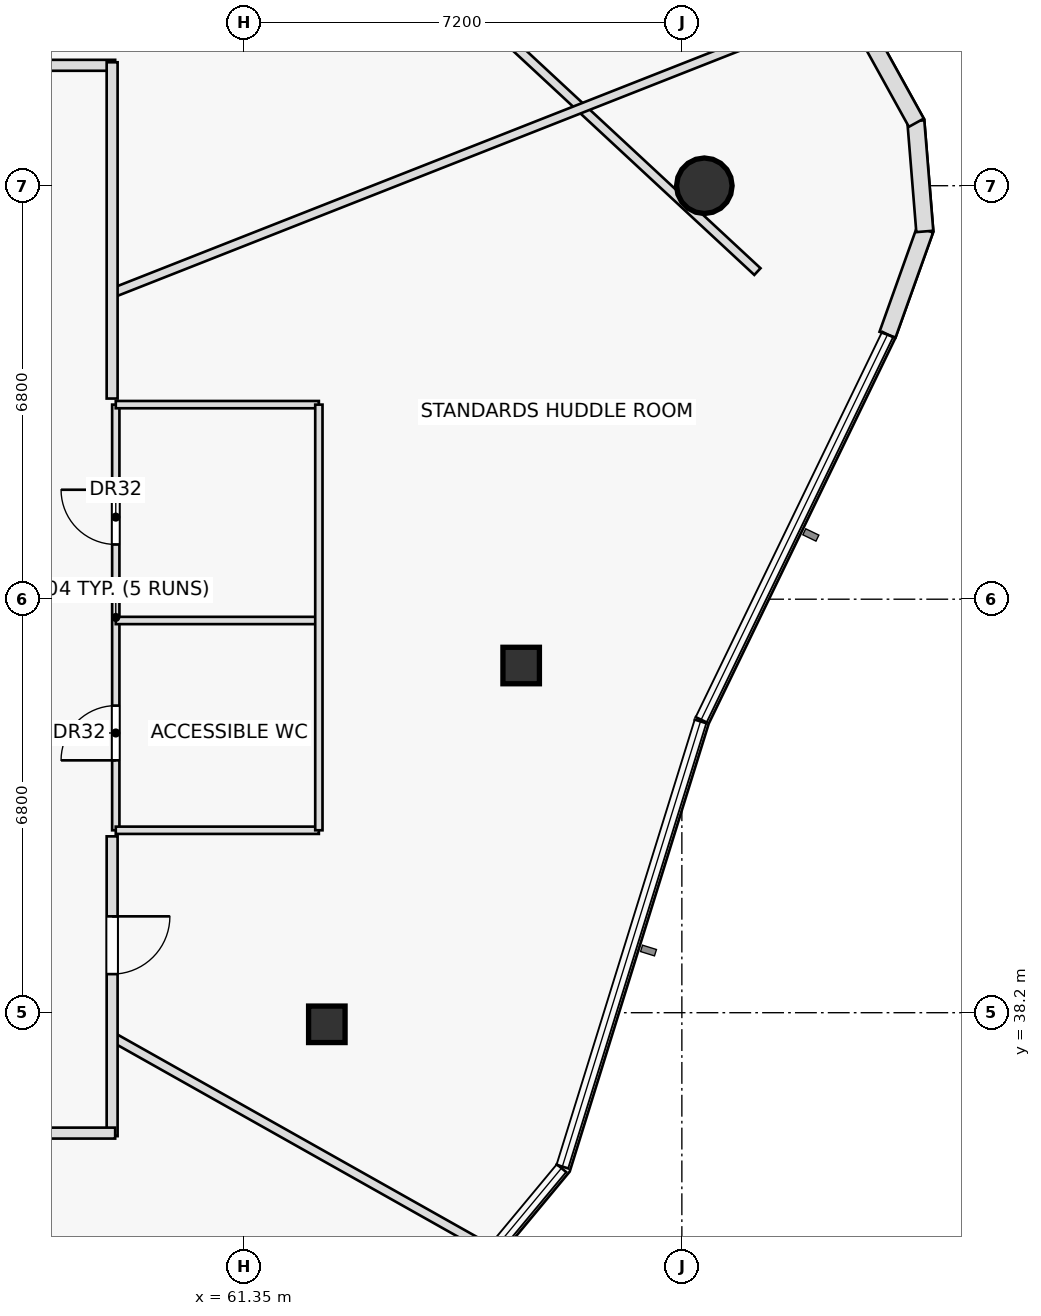
"""IFC4 building model, lengths in metres.
Left out: names, types, materials, properties, quantities, classifications, styles, units other than length and angle.
Written with IfcOpenShell. Run it as: python <this file> out.ifc"""

import sys

from ifc_helpers import new_model, si_unit, direction, frame, frame_2d, origin, origin_2d, place, context, subcontext, project, spatial, rectangle, hollow_rectangle, hollow_circle, extrude, element, fill, save


model = new_model("IFC4")
c1 = context("Model", 3, precision=1e-05, world=origin(), true_north=direction((0.0, 1.0)))
c2 = subcontext(c1, "Body", "Model", "MODEL_VIEW")
j1 = project(units=[si_unit("LENGTHUNIT", "METRE"), si_unit("PLANEANGLEUNIT", "RADIAN")], contexts=[c1])
p1 = place(None, origin())
s1 = spatial("IfcSite", under=j1, at=p1, CompositionType="ELEMENT")
p2 = place(p1, origin())
s2 = spatial("IfcBuilding", under=s1, at=p2, CompositionType="ELEMENT")
p3 = place(p2, frame((0.0, 0.0, 237.95)))
s3 = spatial("IfcBuildingStorey", under=s2, at=p3, CompositionType="ELEMENT", Elevation=237.95)
for number, where, z_axis, x_axis in (
    (1, (62.711, 38.009, 0.0), (0.0, 0.0, 1.0), (1.0, 0.0, 0.0)),
    (2, (65.907, 43.909, 0.0), (0.0, 0.0, 1.0), (1.0, 0.0, 0.0)),
):
    element("IfcColumn", number, at=place(p3, frame(where, z_axis=z_axis, x_axis=x_axis)), inside=s3, PredefinedType="COLUMN", context=c2, shape_type="SweptSolid", body=[
        extrude(hollow_rectangle(XDim=0.6, YDim=0.6, WallThickness=0.036, at=origin_2d()), origin(), (0.0, 0.0, 1.0), 3.65),
    ])
p4 = place(p3, frame((68.92, 51.799, 0.0), z_axis=(0.0, 0.0, 1.0), x_axis=(1.0, 0.0, 0.0)))
e3 = element("IfcColumn", 3, at=p4, inside=s3, PredefinedType="COLUMN", context=c2, shape_type="SweptSolid", body=[
    extrude(hollow_circle(Radius=0.457, WallThickness=0.04, at=origin_2d()), origin(), (0.0, 0.0, 1.0), 3.65),
])
p5 = place(p3, frame((69.792, 50.388, 0.0), z_axis=(0.0, 0.0, 1.0), x_axis=(-0.732769799181, 0.680476613418, 0.0)))
e4 = element("IfcWall", 4, at=p5, inside=s3, PredefinedType="PARTITIONING", context=c2, shape_type="SweptSolid", body=[
    extrude(rectangle(XDim=11.378, YDim=0.15, at=frame_2d((5.689, 0.0))), origin(), (0.0, 0.0, 1.0), 3.025),
])
p6 = place(p3, frame((59.24, 41.2, 0.0), z_axis=(0.0, 0.0, 1.0), x_axis=(0.0, 1.0, 0.0)))
e5 = element("IfcWall", 5, at=p6, inside=s3, PredefinedType="PARTITIONING", context=c2, shape_type="SweptSolid", body=[
    extrude(rectangle(XDim=7.0, YDim=0.12, at=frame_2d((3.5, 0.0))), origin(), (0.0, 0.0, 1.0), 3.65),
])
p7 = place(p6, frame((1.15, 0.0, 0.0)))
e6 = element("IfcOpeningElement", 6, at=p7, cuts=e5, PredefinedType="OPENING", context=c2, shape_type="SweptSolid", body=[
    extrude(rectangle(XDim=0.9, YDim=2.05, at=frame_2d((0.45, 1.025))), frame((0.0, 0.07, 0.0), z_axis=(0.0, -1.0, 0.0), x_axis=(1.0, 0.0, 0.0)), (0.0, 0.0, 1.0), 0.14),
])
p8 = place(p6, frame((4.7, 0.0, 0.0)))
e7 = element("IfcOpeningElement", 7, at=p8, cuts=e5, PredefinedType="OPENING", context=c2, shape_type="SweptSolid", body=[
    extrude(rectangle(XDim=0.9, YDim=2.05, at=frame_2d((0.45, 1.025))), frame((0.0, 0.07, 0.0), z_axis=(0.0, -1.0, 0.0), x_axis=(1.0, 0.0, 0.0)), (0.0, 0.0, 1.0), 0.14),
])
p9 = place(p3, frame((59.24, 41.2, 0.0), z_axis=(0.0, 0.0, 1.0), x_axis=(1.0, 0.0, 0.0)))
e8 = element("IfcWall", 8, at=p9, inside=s3, PredefinedType="PARTITIONING", context=c2, shape_type="SweptSolid", body=[
    extrude(rectangle(XDim=3.34, YDim=0.12, at=frame_2d((1.67, 0.0))), origin(), (0.0, 0.0, 1.0), 3.025),
])
for number, where, z_axis, x_axis in (
    (9, (59.24, 44.65, 0.0), (0.0, 0.0, 1.0), (1.0, 0.0, 0.0)),
    (10, (59.24, 48.2, 0.0), (0.0, 0.0, 1.0), (1.0, 0.0, 0.0)),
):
    element("IfcWall", number, at=place(p3, frame(where, z_axis=z_axis, x_axis=x_axis)), inside=s3, PredefinedType="PARTITIONING", context=c2, shape_type="SweptSolid", body=[
        extrude(rectangle(XDim=3.34, YDim=0.12, at=frame_2d((1.67, 0.0))), origin(), (0.0, 0.0, 1.0), 3.65),
    ])
p10 = place(p3, frame((62.58, 41.2, 0.0), z_axis=(0.0, 0.0, 1.0), x_axis=(0.0, 1.0, 0.0)))
e11 = element("IfcWall", 11, at=p10, inside=s3, PredefinedType="PARTITIONING", context=c2, shape_type="SweptSolid", body=[
    extrude(rectangle(XDim=7.0, YDim=0.12, at=frame_2d((3.5, 0.0))), origin(), (0.0, 0.0, 1.0), 3.325),
])
p11 = place(p3, frame((59.18, 50.034, 0.0), z_axis=(0.0, 0.0, 1.0), x_axis=(0.930421367736, 0.366491580339, 0.0)))
e12 = element("IfcWall", 12, at=p11, inside=s3, PredefinedType="PARTITIONING", context=c2, shape_type="SweptSolid", body=[
    extrude(rectangle(XDim=12.833, YDim=0.15, at=frame_2d((6.417, 0.0))), origin(), (0.0, 0.0, 1.0), 3.025),
])
p12 = place(p3, frame((59.18, 37.804, 0.0), z_axis=(0.0, 0.0, 1.0), x_axis=(0.871363325643, -0.490638313551, 0.0)))
e13 = element("IfcWall", 13, at=p12, inside=s3, PredefinedType="PARTITIONING", context=c2, shape_type="SweptSolid", body=[
    extrude(rectangle(XDim=7.192, YDim=0.15, at=frame_2d((3.596, 0.0))), origin(), (0.0, 0.0, 1.0), 3.135),
])
p13 = place(p3, frame((54.3, 53.78, 0.0), z_axis=(0.0, 0.0, 1.0), x_axis=(1.0, 0.0, 0.0)))
e14 = element("IfcWall", 14, at=p13, inside=s3, PredefinedType="PARTITIONING", context=c2, shape_type="SweptSolid", body=[
    extrude(rectangle(XDim=4.93, YDim=0.18, at=frame_2d((2.465, 0.0))), origin(), (0.0, 0.0, 1.0), 3.65),
])
p14 = place(p13, frame((1.99, 0.0, 0.0)))
e15 = element("IfcOpeningElement", 15, at=p14, cuts=e14, PredefinedType="OPENING", context=c2, shape_type="SweptSolid", body=[
    extrude(rectangle(XDim=0.95, YDim=2.05, at=frame_2d((0.475, 1.025))), frame((0.0, 0.1, 0.0), z_axis=(0.0, -1.0, 0.0), x_axis=(1.0, 0.0, 0.0)), (0.0, 0.0, 1.0), 0.2),
])
p15 = place(p3, frame((59.18, 53.83, 0.0), z_axis=(0.0, 0.0, 1.0), x_axis=(0.0, -1.0, 0.0)))
e16 = element("IfcWall", 16, at=p15, inside=s3, PredefinedType="PARTITIONING", context=c2, shape_type="SweptSolid", body=[
    extrude(rectangle(XDim=5.53, YDim=0.18, at=frame_2d((2.765, 0.0))), origin(), (0.0, 0.0, 1.0), 3.65),
])
p16 = place(p3, frame((59.18, 41.1, 0.0), z_axis=(0.0, 0.0, 1.0), x_axis=(0.0, -1.0, 0.0)))
e17 = element("IfcWall", 17, at=p16, inside=s3, PredefinedType="PARTITIONING", context=c2, shape_type="SweptSolid", body=[
    extrude(rectangle(XDim=4.93, YDim=0.18, at=frame_2d((2.465, 0.0))), origin(), (0.0, 0.0, 1.0), 3.325),
])
p17 = place(p16, frame((1.316, 0.0, 0.0)))
e18 = element("IfcOpeningElement", 18, at=p17, cuts=e17, PredefinedType="OPENING", context=c2, shape_type="SweptSolid", body=[
    extrude(rectangle(XDim=0.95, YDim=2.05, at=frame_2d((0.475, 1.025))), frame((0.0, 0.1, 0.0), z_axis=(0.0, -1.0, 0.0), x_axis=(1.0, 0.0, 0.0)), (0.0, 0.0, 1.0), 0.2),
])
p18 = place(p3, frame((59.23, 36.22, 0.0), z_axis=(0.0, 0.0, 1.0), x_axis=(-1.0, 0.0, 0.0)))
e19 = element("IfcWall", 19, at=p18, inside=s3, PredefinedType="PARTITIONING", context=c2, shape_type="SweptSolid", body=[
    extrude(rectangle(XDim=19.48, YDim=0.18, at=frame_2d((9.74, 0.0))), origin(), (0.0, 0.0, 1.0), 3.025),
])
p19 = place(p18, frame((3.378, 0.0, 0.0)))
e20 = element("IfcOpeningElement", 20, at=p19, cuts=e19, PredefinedType="OPENING", context=c2, shape_type="SweptSolid", body=[
    extrude(rectangle(XDim=0.95, YDim=2.05, at=frame_2d((0.475, 1.025))), frame((0.0, 0.1, 0.0), z_axis=(0.0, -1.0, 0.0), x_axis=(1.0, 0.0, 0.0)), (0.0, 0.0, 1.0), 0.2),
])
p20 = place(p18, frame((8.88, 0.0, 0.0)))
e21 = element("IfcOpeningElement", 21, at=p20, cuts=e19, PredefinedType="OPENING", context=c2, shape_type="SweptSolid", body=[
    extrude(rectangle(XDim=0.95, YDim=2.05, at=frame_2d((0.475, 1.025))), frame((0.0, 0.1, 0.0), z_axis=(0.0, -1.0, 0.0), x_axis=(1.0, 0.0, 0.0)), (0.0, 0.0, 1.0), 0.2),
])
p21 = place(p18, frame((14.756, 0.0, 0.0)))
e22 = element("IfcOpeningElement", 22, at=p21, cuts=e19, PredefinedType="OPENING", context=c2, shape_type="SweptSolid", body=[
    extrude(rectangle(XDim=0.95, YDim=2.05, at=frame_2d((0.475, 1.025))), frame((0.0, 0.1, 0.0), z_axis=(0.0, -1.0, 0.0), x_axis=(1.0, 0.0, 0.0)), (0.0, 0.0, 1.0), 0.2),
])
p22 = place(p3, frame((71.932, 49.35, 0.0), z_axis=(0.0, 0.0, 1.0), x_axis=(0.336403861594, 0.941717814371, 0.0)))
e23 = element("IfcWall", 23, at=p22, inside=s3, PredefinedType="STANDARD", context=c2, shape_type="SweptSolid", body=[
    extrude(rectangle(XDim=1.834, YDim=0.28, at=frame_2d((0.917, 0.0))), origin(), (0.0, 0.0, 1.0), 3.65),
])
p23 = place(p3, frame((72.545, 51.048, 0.0), z_axis=(0.0, 0.0, 1.0), x_axis=(-0.081049675837, 0.996710063181, 0.0)))
e24 = element("IfcWall", 24, at=p23, inside=s3, PredefinedType="STANDARD", context=c2, shape_type="SweptSolid", body=[
    extrude(rectangle(XDim=1.823, YDim=0.28, at=frame_2d((0.911, 0.0))), origin(), (0.0, 0.0, 1.0), 3.65),
])
p24 = place(p3, frame((72.406, 52.836, 0.0), z_axis=(0.0, 0.0, 1.0), x_axis=(-0.484072298636, 0.875028005091, 0.0)))
e25 = element("IfcWall", 25, at=p24, inside=s3, PredefinedType="STANDARD", context=c2, shape_type="SweptSolid", body=[
    extrude(rectangle(XDim=1.822, YDim=0.28, at=frame_2d((0.911, 0.0))), origin(), (0.0, 0.0, 1.0), 3.65),
])
p25 = place(p7, origin())
e26 = element("IfcDoor", 26, at=p25, inside=s3, OperationType="SINGLE_SWING_LEFT", PredefinedType="DOOR", context=c2, shape_type="SweptSolid", body=[
    extrude(rectangle(XDim=0.9, YDim=2.05, at=frame_2d((0.45, 1.025))), frame((0.0, 0.025, 0.0), z_axis=(0.0, -1.0, 0.0), x_axis=(1.0, 0.0, 0.0)), (0.0, 0.0, 1.0), 0.05),
])
fill(e6, e26)
p26 = place(p8, origin())
e27 = element("IfcDoor", 27, at=p26, inside=s3, OperationType="SINGLE_SWING_RIGHT", PredefinedType="DOOR", context=c2, shape_type="SweptSolid", body=[
    extrude(rectangle(XDim=0.9, YDim=2.05, at=frame_2d((0.45, 1.025))), frame((0.0, 0.025, 0.0), z_axis=(0.0, -1.0, 0.0), x_axis=(1.0, 0.0, 0.0)), (0.0, 0.0, 1.0), 0.05),
])
fill(e7, e27)
p27 = place(p17, origin())
e28 = element("IfcDoor", 28, at=p27, inside=s3, OperationType="SINGLE_SWING_LEFT", PredefinedType="DOOR", context=c2, shape_type="SweptSolid", body=[
    extrude(rectangle(XDim=0.95, YDim=2.05, at=frame_2d((0.475, 1.025))), frame((0.0, 0.025, 0.0), z_axis=(0.0, -1.0, 0.0), x_axis=(1.0, 0.0, 0.0)), (0.0, 0.0, 1.0), 0.05),
])
fill(e18, e28)
save(model, sys.argv[1])
